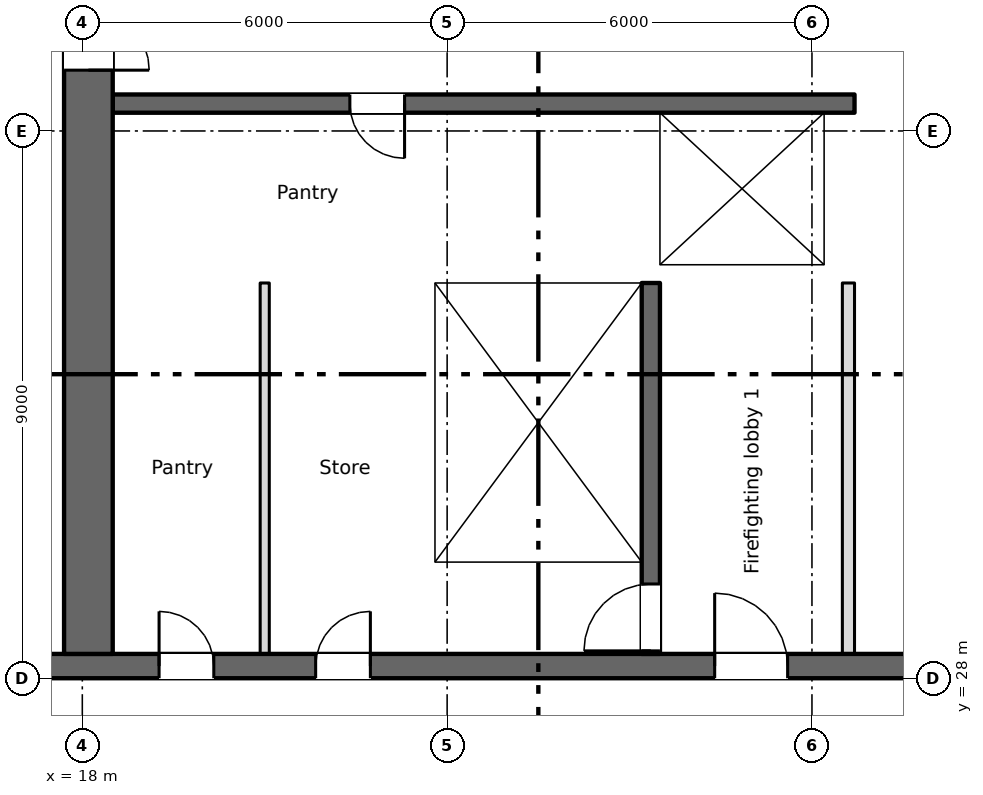
"""IFC4 building model, lengths in metres.
Left out: names, types, materials, properties, quantities, classifications, styles, units other than length and angle.
Written with IfcOpenShell. Run it as: python <this file> out.ifc"""

import sys

from ifc_helpers import new_model, si_unit, direction, frame, frame_2d, origin, place, context, subcontext, project, spatial, rectangle, extrude, element, fill, save


model = new_model("IFC4")
c1 = context("Model", 3, precision=1e-05, world=origin(), true_north=direction((0.0, 1.0)))
c2 = subcontext(c1, "Body", "Model", "MODEL_VIEW")
j1 = project(units=[si_unit("LENGTHUNIT", "METRE"), si_unit("PLANEANGLEUNIT", "RADIAN")], contexts=[c1])
p1 = place(None, origin())
s1 = spatial("IfcSite", under=j1, at=p1, CompositionType="ELEMENT")
p2 = place(p1, origin())
s2 = spatial("IfcBuilding", under=s1, at=p2, CompositionType="ELEMENT")
p3 = place(p2, frame((0.0, 0.0, 113.75)))
s3 = spatial("IfcBuildingStorey", under=s2, at=p3, CompositionType="ELEMENT", Elevation=113.75)
p4 = place(p3, frame((6.7, 28.2, 0.0), z_axis=(0.0, 0.0, 1.0), x_axis=(1.0, 0.0, 0.0)))
e1 = element("IfcWall", 1, at=p4, inside=s3, PredefinedType="SHEAR", context=c2, shape_type="SweptSolid", body=[
    extrude(rectangle(XDim=57.8, YDim=0.4, at=frame_2d((28.9, 0.0))), origin(), (0.0, 0.0, 1.0), 3.35),
])
p5 = place(p4, frame((12.562, 0.0, 0.0)))
e2 = element("IfcOpeningElement", 2, at=p5, cuts=e1, PredefinedType="OPENING", context=c2, shape_type="SweptSolid", body=[
    extrude(rectangle(XDim=0.9, YDim=2.1, at=frame_2d((0.45, 1.05))), frame((0.0, 0.21, 0.0), z_axis=(0.0, -1.0, 0.0), x_axis=(1.0, 0.0, 0.0)), (0.0, 0.0, 1.0), 0.42),
])
p6 = place(p4, frame((15.137, 0.0, 0.0)))
e3 = element("IfcOpeningElement", 3, at=p6, cuts=e1, PredefinedType="OPENING", context=c2, shape_type="SweptSolid", body=[
    extrude(rectangle(XDim=0.9, YDim=2.1, at=frame_2d((0.45, 1.05))), frame((0.0, 0.21, 0.0), z_axis=(0.0, -1.0, 0.0), x_axis=(1.0, 0.0, 0.0)), (0.0, 0.0, 1.0), 0.42),
])
p7 = place(p4, frame((49.85, 0.0, 0.0)))
e4 = element("IfcOpeningElement", 4, at=p7, cuts=e1, PredefinedType="OPENING", context=c2, shape_type="SweptSolid", body=[
    extrude(rectangle(XDim=0.9, YDim=2.1, at=frame_2d((0.45, 1.05))), frame((0.0, 0.21, 0.0), z_axis=(0.0, -1.0, 0.0), x_axis=(1.0, 0.0, 0.0)), (0.0, 0.0, 1.0), 0.42),
])
p8 = place(p4, frame((0.562, 0.0, 0.0)))
e5 = element("IfcOpeningElement", 5, at=p8, cuts=e1, PredefinedType="OPENING", context=c2, shape_type="SweptSolid", body=[
    extrude(rectangle(XDim=0.9, YDim=2.1, at=frame_2d((0.45, 1.05))), frame((0.0, 0.21, 0.0), z_axis=(0.0, -1.0, 0.0), x_axis=(1.0, 0.0, 0.0)), (0.0, 0.0, 1.0), 0.42),
])
p9 = place(p4, frame((2.137, 0.0, 0.0)))
e6 = element("IfcOpeningElement", 6, at=p9, cuts=e1, PredefinedType="OPENING", context=c2, shape_type="SweptSolid", body=[
    extrude(rectangle(XDim=0.9, YDim=2.1, at=frame_2d((0.45, 1.05))), frame((0.0, 0.21, 0.0), z_axis=(0.0, -1.0, 0.0), x_axis=(1.0, 0.0, 0.0)), (0.0, 0.0, 1.0), 0.42),
])
p10 = place(p4, frame((4.7, 0.0, 0.0)))
e7 = element("IfcOpeningElement", 7, at=p10, cuts=e1, PredefinedType="OPENING", context=c2, shape_type="SweptSolid", body=[
    extrude(rectangle(XDim=1.2, YDim=2.1, at=frame_2d((0.6, 1.05))), frame((0.0, 0.21, 0.0), z_axis=(0.0, -1.0, 0.0), x_axis=(1.0, 0.0, 0.0)), (0.0, 0.0, 1.0), 0.42),
])
p11 = place(p4, frame((31.7, 0.0, 0.0)))
e8 = element("IfcOpeningElement", 8, at=p11, cuts=e1, PredefinedType="OPENING", context=c2, shape_type="SweptSolid", body=[
    extrude(rectangle(XDim=1.2, YDim=2.1, at=frame_2d((0.6, 1.05))), frame((0.0, 0.21, 0.0), z_axis=(0.0, -1.0, 0.0), x_axis=(1.0, 0.0, 0.0)), (0.0, 0.0, 1.0), 0.42),
])
p12 = place(p4, frame((55.2, 0.0, 0.0)))
e9 = element("IfcOpeningElement", 9, at=p12, cuts=e1, PredefinedType="OPENING", context=c2, shape_type="SweptSolid", body=[
    extrude(rectangle(XDim=1.2, YDim=2.1, at=frame_2d((0.6, 1.05))), frame((0.0, 0.21, 0.0), z_axis=(0.0, -1.0, 0.0), x_axis=(1.0, 0.0, 0.0)), (0.0, 0.0, 1.0), 0.42),
])
p13 = place(p4, frame((21.7, 0.0, 0.0)))
e10 = element("IfcOpeningElement", 10, at=p13, cuts=e1, PredefinedType="OPENING", context=c2, shape_type="SweptSolid", body=[
    extrude(rectangle(XDim=1.2, YDim=2.1, at=frame_2d((0.6, 1.05))), frame((0.0, 0.21, 0.0), z_axis=(0.0, -1.0, 0.0), x_axis=(1.0, 0.0, 0.0)), (0.0, 0.0, 1.0), 0.42),
])
p14 = place(p4, frame((41.7, 0.0, 0.0)))
e11 = element("IfcOpeningElement", 11, at=p14, cuts=e1, PredefinedType="OPENING", context=c2, shape_type="SweptSolid", body=[
    extrude(rectangle(XDim=1.2, YDim=2.1, at=frame_2d((0.6, 1.05))), frame((0.0, 0.21, 0.0), z_axis=(0.0, -1.0, 0.0), x_axis=(1.0, 0.0, 0.0)), (0.0, 0.0, 1.0), 0.42),
])
p15 = place(p4, frame((24.85, 0.0, 0.0)))
e12 = element("IfcOpeningElement", 12, at=p15, cuts=e1, PredefinedType="OPENING", context=c2, shape_type="SweptSolid", body=[
    extrude(rectangle(XDim=2.4, YDim=2.1, at=frame_2d((1.2, 1.05))), frame((0.0, 0.21, 0.0), z_axis=(0.0, -1.0, 0.0), x_axis=(1.0, 0.0, 0.0)), (0.0, 0.0, 1.0), 0.42),
])
p16 = place(p4, frame((37.35, 0.0, 0.0)))
e13 = element("IfcOpeningElement", 13, at=p16, cuts=e1, PredefinedType="OPENING", context=c2, shape_type="SweptSolid", body=[
    extrude(rectangle(XDim=2.4, YDim=2.1, at=frame_2d((1.2, 1.05))), frame((0.0, 0.21, 0.0), z_axis=(0.0, -1.0, 0.0), x_axis=(1.0, 0.0, 0.0)), (0.0, 0.0, 1.0), 0.42),
])
p17 = place(p4, frame((7.95, 0.0, 0.0)))
e14 = element("IfcOpeningElement", 14, at=p17, cuts=e1, PredefinedType="OPENING", context=c2, shape_type="SweptSolid", body=[
    extrude(rectangle(XDim=2.4, YDim=2.1, at=frame_2d((1.2, 1.05))), frame((0.0, 0.21, 0.0), z_axis=(0.0, -1.0, 0.0), x_axis=(1.0, 0.0, 0.0)), (0.0, 0.0, 1.0), 0.42),
])
p18 = place(p4, frame((28.85, 0.0, 0.0)))
e15 = element("IfcOpeningElement", 15, at=p18, cuts=e1, PredefinedType="OPENING", context=c2, shape_type="SweptSolid", body=[
    extrude(rectangle(XDim=0.9, YDim=2.1, at=frame_2d((0.45, 1.05))), frame((0.0, 0.21, 0.0), z_axis=(0.0, -1.0, 0.0), x_axis=(1.0, 0.0, 0.0)), (0.0, 0.0, 1.0), 0.42),
])
p19 = place(p4, frame((34.85, 0.0, 0.0)))
e16 = element("IfcOpeningElement", 16, at=p19, cuts=e1, PredefinedType="OPENING", context=c2, shape_type="SweptSolid", body=[
    extrude(rectangle(XDim=0.9, YDim=2.1, at=frame_2d((0.45, 1.05))), frame((0.0, 0.21, 0.0), z_axis=(0.0, -1.0, 0.0), x_axis=(1.0, 0.0, 0.0)), (0.0, 0.0, 1.0), 0.42),
])
p20 = place(p3, frame((18.1, 28.4, 0.0), z_axis=(0.0, 0.0, 1.0), x_axis=(0.0, 1.0, 0.0)))
e17 = element("IfcWall", 17, at=p20, inside=s3, PredefinedType="SHEAR", context=c2, shape_type="SweptSolid", body=[
    extrude(rectangle(XDim=16.8, YDim=0.8, at=frame_2d((8.4, 0.0))), origin(), (0.0, 0.0, 1.0), 3.35),
])
p21 = place(p20, frame((9.6, 0.0, 0.0)))
e18 = element("IfcOpeningElement", 18, at=p21, cuts=e17, PredefinedType="OPENING", context=c2, shape_type="SweptSolid", body=[
    extrude(rectangle(XDim=2.0, YDim=2.1, at=frame_2d((1.0, 1.05))), frame((0.0, 0.41, 0.0), z_axis=(0.0, -1.0, 0.0), x_axis=(1.0, 0.0, 0.0)), (0.0, 0.0, 1.0), 0.82),
])
p22 = place(p20, frame((15.35, 0.0, 0.0)))
e19 = element("IfcOpeningElement", 19, at=p22, cuts=e17, PredefinedType="OPENING", context=c2, shape_type="SweptSolid", body=[
    extrude(rectangle(XDim=1.2, YDim=2.1, at=frame_2d((0.6, 1.05))), frame((0.0, 0.41, 0.0), z_axis=(0.0, -1.0, 0.0), x_axis=(1.0, 0.0, 0.0)), (0.0, 0.0, 1.0), 0.82),
])
p23 = place(p3, frame((23.65, 28.4, 0.0), z_axis=(0.0, 0.0, 1.0), x_axis=(0.0, 1.0, 0.0)))
e20 = element("IfcWall", 20, at=p23, inside=s3, PredefinedType="SHEAR", context=c2, shape_type="SweptSolid", body=[
    extrude(rectangle(XDim=6.1, YDim=0.3, at=frame_2d((3.05, 0.0))), origin(), (0.0, 0.0, 1.0), 3.35),
])
p24 = place(p3, frame((27.35, 28.4, 0.0), z_axis=(0.0, 0.0, 1.0), x_axis=(0.0, 1.0, 0.0)))
e21 = element("IfcWall", 21, at=p24, inside=s3, PredefinedType="SHEAR", context=c2, shape_type="SweptSolid", body=[
    extrude(rectangle(XDim=6.1, YDim=0.3, at=frame_2d((3.05, 0.0))), origin(), (0.0, 0.0, 1.0), 3.35),
])
p25 = place(p24, frame((0.05, 0.0, 0.0)))
e22 = element("IfcOpeningElement", 22, at=p25, cuts=e21, PredefinedType="OPENING", context=c2, shape_type="SweptSolid", body=[
    extrude(rectangle(XDim=1.1, YDim=2.1, at=frame_2d((0.55, 1.05))), frame((0.0, 0.16, 0.0), z_axis=(0.0, -1.0, 0.0), x_axis=(1.0, 0.0, 0.0)), (0.0, 0.0, 1.0), 0.32),
])
p26 = place(p3, frame((18.5, 34.65, 0.0), z_axis=(0.0, 0.0, 1.0), x_axis=(1.0, 0.0, 0.0)))
e23 = element("IfcWall", 23, at=p26, inside=s3, PredefinedType="SHEAR", context=c2, shape_type="SweptSolid", body=[
    extrude(rectangle(XDim=12.2, YDim=0.3, at=frame_2d((6.1, 0.0))), origin(), (0.0, 0.0, 1.0), 3.35),
])
p27 = place(p26, frame((9.8, 0.0, 0.0)))
e24 = element("IfcOpeningElement", 24, at=p27, cuts=e23, PredefinedType="OPENING", context=c2, shape_type="SweptSolid", body=[
    extrude(rectangle(XDim=1.1, YDim=2.1, at=frame_2d((0.55, 1.05))), frame((0.0, 0.16, 0.0), z_axis=(0.0, -1.0, 0.0), x_axis=(1.0, 0.0, 0.0)), (0.0, 0.0, 1.0), 0.32),
])
p28 = place(p3, frame((30.7, 37.45, 0.0), z_axis=(0.0, 0.0, 1.0), x_axis=(-1.0, 0.0, 0.0)))
e25 = element("IfcWall", 25, at=p28, inside=s3, PredefinedType="SHEAR", context=c2, shape_type="SweptSolid", body=[
    extrude(rectangle(XDim=12.2, YDim=0.3, at=frame_2d((6.1, 0.0))), origin(), (0.0, 0.0, 1.0), 3.35),
])
p29 = place(p28, frame((7.4, 0.0, 0.0)))
e26 = element("IfcOpeningElement", 26, at=p29, cuts=e25, PredefinedType="OPENING", context=c2, shape_type="SweptSolid", body=[
    extrude(rectangle(XDim=0.9, YDim=2.1, at=frame_2d((0.45, 1.05))), frame((0.0, 0.16, 0.0), z_axis=(0.0, -1.0, 0.0), x_axis=(1.0, 0.0, 0.0)), (0.0, 0.0, 1.0), 0.32),
])
p30 = place(p3, frame((27.35, 34.8, 0.0), z_axis=(0.0, 0.0, 1.0), x_axis=(0.0, 1.0, 0.0)))
e27 = element("IfcWall", 27, at=p30, inside=s3, PredefinedType="SHEAR", context=c2, shape_type="SweptSolid", body=[
    extrude(rectangle(XDim=2.5, YDim=0.3, at=frame_2d((1.25, 0.0))), origin(), (0.0, 0.0, 1.0), 3.35),
])
p31 = place(p3, frame((30.45, 34.8, 0.0), z_axis=(0.0, 0.0, 1.0), x_axis=(0.0, 1.0, 0.0)))
e28 = element("IfcWall", 28, at=p31, inside=s3, PredefinedType="SHEAR", context=c2, shape_type="SweptSolid", body=[
    extrude(rectangle(XDim=2.5, YDim=0.5, at=frame_2d((1.25, 0.0))), origin(), (0.0, 0.0, 1.0), 3.35),
])
p32 = place(p3, frame((30.6, 28.4, 0.0), z_axis=(0.0, 0.0, 1.0), x_axis=(0.0, 1.0, 0.0)))
e29 = element("IfcWall", 29, at=p32, inside=s3, PredefinedType="PARTITIONING", context=c2, shape_type="SweptSolid", body=[
    extrude(rectangle(XDim=6.1, YDim=0.2, at=frame_2d((3.05, 0.0))), origin(), (0.0, 0.0, 1.0), 3.35),
])
p33 = place(p3, frame((21.0, 28.4, 0.0), z_axis=(0.0, 0.0, 1.0), x_axis=(0.0, 1.0, 0.0)))
e30 = element("IfcWall", 30, at=p33, inside=s3, PredefinedType="PARTITIONING", context=c2, shape_type="SweptSolid", body=[
    extrude(rectangle(XDim=6.1, YDim=0.15, at=frame_2d((3.05, 0.0))), origin(), (0.0, 0.0, 1.0), 3.35),
])
p34 = place(p5, origin())
e31 = element("IfcDoor", 31, at=p34, inside=s3, OperationType="SINGLE_SWING_LEFT", PredefinedType="DOOR", context=c2, shape_type="SweptSolid", body=[
    extrude(rectangle(XDim=0.9, YDim=2.1, at=frame_2d((0.45, 1.05))), frame((0.0, 0.025, 0.0), z_axis=(0.0, -1.0, 0.0), x_axis=(1.0, 0.0, 0.0)), (0.0, 0.0, 1.0), 0.05),
])
fill(e2, e31)
p35 = place(p6, origin())
e32 = element("IfcDoor", 32, at=p35, inside=s3, OperationType="SINGLE_SWING_RIGHT", PredefinedType="DOOR", context=c2, shape_type="SweptSolid", body=[
    extrude(rectangle(XDim=0.9, YDim=2.1, at=frame_2d((0.45, 1.05))), frame((0.0, 0.025, 0.0), z_axis=(0.0, -1.0, 0.0), x_axis=(1.0, 0.0, 0.0)), (0.0, 0.0, 1.0), 0.05),
])
fill(e3, e32)
p36 = place(p29, origin())
e33 = element("IfcDoor", 33, at=p36, inside=s3, OperationType="SINGLE_SWING_LEFT", PredefinedType="DOOR", context=c2, shape_type="SweptSolid", body=[
    extrude(rectangle(XDim=0.9, YDim=2.1, at=frame_2d((0.45, 1.05))), frame((0.0, 0.025, 0.0), z_axis=(0.0, -1.0, 0.0), x_axis=(1.0, 0.0, 0.0)), (0.0, 0.0, 1.0), 0.05),
])
fill(e26, e33)
p37 = place(p27, origin())
e34 = element("IfcDoor", 34, at=p37, inside=s3, OperationType="SLIDING_TO_LEFT", PredefinedType="DOOR", context=c2, shape_type="SweptSolid", body=[
    extrude(rectangle(XDim=1.1, YDim=2.1, at=frame_2d((0.55, 1.05))), frame((0.0, 0.025, 0.0), z_axis=(0.0, -1.0, 0.0), x_axis=(1.0, 0.0, 0.0)), (0.0, 0.0, 1.0), 0.05),
])
fill(e24, e34)
p38 = place(p25, origin())
e35 = element("IfcDoor", 35, at=p38, inside=s3, OperationType="SINGLE_SWING_LEFT", PredefinedType="DOOR", context=c2, shape_type="SweptSolid", body=[
    extrude(rectangle(XDim=1.1, YDim=2.1, at=frame_2d((0.55, 1.05))), frame((0.0, 0.025, 0.0), z_axis=(0.0, -1.0, 0.0), x_axis=(1.0, 0.0, 0.0)), (0.0, 0.0, 1.0), 0.05),
])
fill(e22, e35)
p39 = place(p13, origin())
e36 = element("IfcDoor", 36, at=p39, inside=s3, OperationType="SINGLE_SWING_LEFT", PredefinedType="DOOR", context=c2, shape_type="SweptSolid", body=[
    extrude(rectangle(XDim=1.2, YDim=2.1, at=frame_2d((0.6, 1.05))), frame((0.0, 0.025, 0.0), z_axis=(0.0, -1.0, 0.0), x_axis=(1.0, 0.0, 0.0)), (0.0, 0.0, 1.0), 0.05),
])
fill(e10, e36)
p40 = place(p21, origin())
e37 = element("IfcDoor", 37, at=p40, inside=s3, OperationType="DOUBLE_DOOR_SINGLE_SWING", PredefinedType="DOOR", context=c2, shape_type="SweptSolid", body=[
    extrude(rectangle(XDim=2.0, YDim=2.1, at=frame_2d((1.0, 1.05))), frame((0.0, 0.025, 0.0), z_axis=(0.0, -1.0, 0.0), x_axis=(1.0, 0.0, 0.0)), (0.0, 0.0, 1.0), 0.05),
])
fill(e18, e37)
save(model, sys.argv[1])
